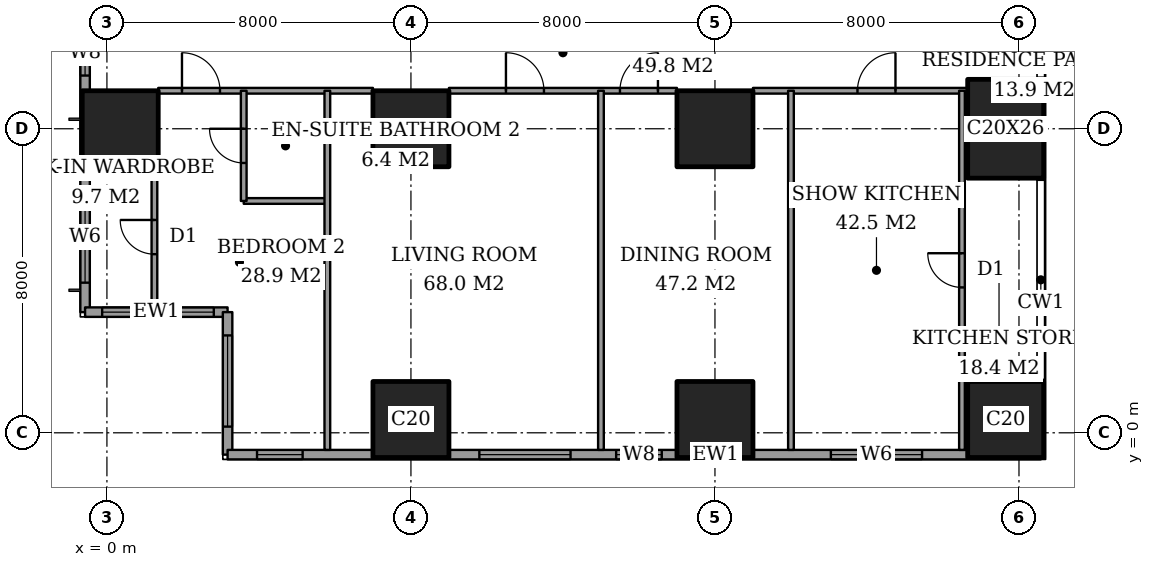
"""IFC4 building model, lengths in metres.
Left out: names, types, materials, properties, quantities, classifications, styles, units other than length and angle.
Written with IfcOpenShell. Run it as: python <this file> out.ifc"""

import sys

from ifc_helpers import new_model, si_unit, direction, frame, frame_2d, origin, origin_2d, place, context, subcontext, project, spatial, rectangle, extrude, element, fill, save


model = new_model("IFC4")
c1 = context("Model", 3, precision=1e-05, world=origin(), true_north=direction((0.0, 1.0)))
c2 = subcontext(c1, "Body", "Model", "MODEL_VIEW")
j1 = project(units=[si_unit("LENGTHUNIT", "METRE"), si_unit("PLANEANGLEUNIT", "RADIAN")], contexts=[c1])
p1 = place(None, origin())
s1 = spatial("IfcSite", under=j1, at=p1, CompositionType="ELEMENT")
p2 = place(p1, origin())
s2 = spatial("IfcBuilding", under=s1, at=p2, CompositionType="ELEMENT")
p3 = place(p2, frame((0.0, 0.0, 72.8)))
s3 = spatial("IfcBuildingStorey", under=s2, at=p3, CompositionType="ELEMENT", Elevation=72.8)
for number, where, z_axis, x_axis in (
    (1, (0.35, 8.0, 0.0), (0.0, 0.0, 1.0), (1.0, 0.0, 0.0)),
    (2, (8.0, 0.35, 0.0), (0.0, 0.0, 1.0), (1.0, 0.0, 0.0)),
    (3, (8.0, 8.0, 0.0), (0.0, 0.0, 1.0), (1.0, 0.0, 0.0)),
    (4, (16.0, 0.35, 0.0), (0.0, 0.0, 1.0), (1.0, 0.0, 0.0)),
    (5, (16.0, 8.0, 0.0), (0.0, 0.0, 1.0), (1.0, 0.0, 0.0)),
    (6, (23.65, 0.35, 0.0), (0.0, 0.0, 1.0), (1.0, 0.0, 0.0)),
):
    element("IfcColumn", number, at=place(p3, frame(where, z_axis=z_axis, x_axis=x_axis)), inside=s3, PredefinedType="COLUMN", context=c2, shape_type="SweptSolid", body=[
        extrude(rectangle(XDim=2.0, YDim=2.0, at=origin_2d()), origin(), (0.0, 0.0, 1.0), 3.6),
    ])
p4 = place(p3, frame((23.65, 8.0, 0.0), z_axis=(0.0, 0.0, 1.0), x_axis=(1.0, 0.0, 0.0)))
e7 = element("IfcColumn", 7, at=p4, inside=s3, PredefinedType="COLUMN", context=c2, shape_type="SweptSolid", body=[
    extrude(rectangle(XDim=2.0, YDim=2.6, at=origin_2d()), origin(), (0.0, 0.0, 1.0), 3.6),
])
p5 = place(p3, frame((-0.575, 44.825, 0.0), z_axis=(0.0, 0.0, 1.0), x_axis=(0.0, -1.0, 0.0)))
e8 = element("IfcWall", 8, at=p5, inside=s3, PredefinedType="SOLIDWALL", context=c2, shape_type="SweptSolid", body=[
    extrude(rectangle(XDim=41.65, YDim=0.25, at=frame_2d((20.825, 0.0))), origin(), (0.0, 0.0, 1.0), 3.6),
])
p6 = place(p5, frame((0.775, 0.0, 0.6)))
e9 = element("IfcOpeningElement", 9, at=p6, cuts=e8, PredefinedType="OPENING", context=c2, shape_type="SweptSolid", body=[
    extrude(rectangle(XDim=2.4, YDim=2.0, at=frame_2d((1.2, 1.0))), frame((0.0, 0.135, 0.0), z_axis=(0.0, -1.0, 0.0), x_axis=(1.0, 0.0, 0.0)), (0.0, 0.0, 1.0), 0.27),
])
p7 = place(p5, frame((6.1, 0.0, 0.6)))
e10 = element("IfcOpeningElement", 10, at=p7, cuts=e8, PredefinedType="OPENING", context=c2, shape_type="SweptSolid", body=[
    extrude(rectangle(XDim=1.2, YDim=2.0, at=frame_2d((0.6, 1.0))), frame((0.0, 0.135, 0.0), z_axis=(0.0, -1.0, 0.0), x_axis=(1.0, 0.0, 0.0)), (0.0, 0.0, 1.0), 0.27),
])
p8 = place(p5, frame((8.425, 0.0, 0.6)))
e11 = element("IfcOpeningElement", 11, at=p8, cuts=e8, PredefinedType="OPENING", context=c2, shape_type="SweptSolid", body=[
    extrude(rectangle(XDim=2.4, YDim=2.0, at=frame_2d((1.2, 1.0))), frame((0.0, 0.135, 0.0), z_axis=(0.0, -1.0, 0.0), x_axis=(1.0, 0.0, 0.0)), (0.0, 0.0, 1.0), 0.27),
])
p9 = place(p5, frame((15.625, 0.0, 0.6)))
e12 = element("IfcOpeningElement", 12, at=p9, cuts=e8, PredefinedType="OPENING", context=c2, shape_type="SweptSolid", body=[
    extrude(rectangle(XDim=2.4, YDim=2.0, at=frame_2d((1.2, 1.0))), frame((0.0, 0.135, 0.0), z_axis=(0.0, -1.0, 0.0), x_axis=(1.0, 0.0, 0.0)), (0.0, 0.0, 1.0), 0.27),
])
p10 = place(p5, frame((23.625, 0.0, 0.6)))
e13 = element("IfcOpeningElement", 13, at=p10, cuts=e8, PredefinedType="OPENING", context=c2, shape_type="SweptSolid", body=[
    extrude(rectangle(XDim=2.4, YDim=2.0, at=frame_2d((1.2, 1.0))), frame((0.0, 0.135, 0.0), z_axis=(0.0, -1.0, 0.0), x_axis=(1.0, 0.0, 0.0)), (0.0, 0.0, 1.0), 0.27),
])
p11 = place(p5, frame((30.625, 0.0, 0.6)))
e14 = element("IfcOpeningElement", 14, at=p11, cuts=e8, PredefinedType="OPENING", context=c2, shape_type="SweptSolid", body=[
    extrude(rectangle(XDim=2.4, YDim=2.0, at=frame_2d((1.2, 1.0))), frame((0.0, 0.135, 0.0), z_axis=(0.0, -1.0, 0.0), x_axis=(1.0, 0.0, 0.0)), (0.0, 0.0, 1.0), 0.27),
])
p12 = place(p5, frame((34.225, 0.0, 0.6)))
e15 = element("IfcOpeningElement", 15, at=p12, cuts=e8, PredefinedType="OPENING", context=c2, shape_type="SweptSolid", body=[
    extrude(rectangle(XDim=1.2, YDim=2.0, at=frame_2d((0.6, 1.0))), frame((0.0, 0.135, 0.0), z_axis=(0.0, -1.0, 0.0), x_axis=(1.0, 0.0, 0.0)), (0.0, 0.0, 1.0), 0.27),
])
p13 = place(p5, frame((38.475, 0.0, 0.6)))
e16 = element("IfcOpeningElement", 16, at=p13, cuts=e8, PredefinedType="OPENING", context=c2, shape_type="SweptSolid", body=[
    extrude(rectangle(XDim=2.4, YDim=2.0, at=frame_2d((1.2, 1.0))), frame((0.0, 0.135, 0.0), z_axis=(0.0, -1.0, 0.0), x_axis=(1.0, 0.0, 0.0)), (0.0, 0.0, 1.0), 0.27),
])
p14 = place(p3, frame((-0.575, 3.175, 0.0), z_axis=(0.0, 0.0, 1.0), x_axis=(1.0, 0.0, 0.0)))
e17 = element("IfcWall", 17, at=p14, inside=s3, PredefinedType="SOLIDWALL", context=c2, shape_type="SweptSolid", body=[
    extrude(rectangle(XDim=3.75, YDim=0.25, at=frame_2d((1.875, 0.0))), origin(), (0.0, 0.0, 1.0), 3.6),
])
p15 = place(p14, frame((0.45, 0.0, 0.6)))
e18 = element("IfcOpeningElement", 18, at=p15, cuts=e17, PredefinedType="OPENING", context=c2, shape_type="SweptSolid", body=[
    extrude(rectangle(XDim=1.2, YDim=2.0, at=frame_2d((0.6, 1.0))), frame((0.0, 0.135, 0.0), z_axis=(0.0, -1.0, 0.0), x_axis=(1.0, 0.0, 0.0)), (0.0, 0.0, 1.0), 0.27),
])
p16 = place(p14, frame((2.188, 0.0, 0.6)))
e19 = element("IfcOpeningElement", 19, at=p16, cuts=e17, PredefinedType="OPENING", context=c2, shape_type="SweptSolid", body=[
    extrude(rectangle(XDim=1.2, YDim=2.0, at=frame_2d((0.6, 1.0))), frame((0.0, 0.135, 0.0), z_axis=(0.0, -1.0, 0.0), x_axis=(1.0, 0.0, 0.0)), (0.0, 0.0, 1.0), 0.27),
])
p17 = place(p3, frame((3.175, 3.175, 0.0), z_axis=(0.0, 0.0, 1.0), x_axis=(0.0, -1.0, 0.0)))
e20 = element("IfcWall", 20, at=p17, inside=s3, PredefinedType="SOLIDWALL", context=c2, shape_type="SweptSolid", body=[
    extrude(rectangle(XDim=3.75, YDim=0.25, at=frame_2d((1.875, 0.0))), origin(), (0.0, 0.0, 1.0), 3.6),
])
p18 = place(p17, frame((0.613, 0.0, 0.6)))
e21 = element("IfcOpeningElement", 21, at=p18, cuts=e20, PredefinedType="OPENING", context=c2, shape_type="SweptSolid", body=[
    extrude(rectangle(XDim=2.4, YDim=2.0, at=frame_2d((1.2, 1.0))), frame((0.0, 0.135, 0.0), z_axis=(0.0, -1.0, 0.0), x_axis=(1.0, 0.0, 0.0)), (0.0, 0.0, 1.0), 0.27),
])
p19 = place(p3, frame((3.175, -0.575, 0.0), z_axis=(0.0, 0.0, 1.0), x_axis=(1.0, 0.0, 0.0)))
e22 = element("IfcWall", 22, at=p19, inside=s3, PredefinedType="SOLIDWALL", context=c2, shape_type="SweptSolid", body=[
    extrude(rectangle(XDim=21.4, YDim=0.25, at=frame_2d((10.7, 0.0))), origin(), (0.0, 0.0, 1.0), 3.6),
])
p20 = place(p19, frame((0.775, 0.0, 0.6)))
e23 = element("IfcOpeningElement", 23, at=p20, cuts=e22, PredefinedType="OPENING", context=c2, shape_type="SweptSolid", body=[
    extrude(rectangle(XDim=1.2, YDim=2.0, at=frame_2d((0.6, 1.0))), frame((0.0, 0.135, 0.0), z_axis=(0.0, -1.0, 0.0), x_axis=(1.0, 0.0, 0.0)), (0.0, 0.0, 1.0), 0.27),
])
p21 = place(p19, frame((6.625, 0.0, 0.6)))
e24 = element("IfcOpeningElement", 24, at=p21, cuts=e22, PredefinedType="OPENING", context=c2, shape_type="SweptSolid", body=[
    extrude(rectangle(XDim=2.4, YDim=2.0, at=frame_2d((1.2, 1.0))), frame((0.0, 0.135, 0.0), z_axis=(0.0, -1.0, 0.0), x_axis=(1.0, 0.0, 0.0)), (0.0, 0.0, 1.0), 0.27),
])
p22 = place(p19, frame((10.225, 0.0, 0.6)))
e25 = element("IfcOpeningElement", 25, at=p22, cuts=e22, PredefinedType="OPENING", context=c2, shape_type="SweptSolid", body=[
    extrude(rectangle(XDim=1.2, YDim=2.0, at=frame_2d((0.6, 1.0))), frame((0.0, 0.135, 0.0), z_axis=(0.0, -1.0, 0.0), x_axis=(1.0, 0.0, 0.0)), (0.0, 0.0, 1.0), 0.27),
])
p23 = place(p19, frame((15.875, 0.0, 0.6)))
e26 = element("IfcOpeningElement", 26, at=p23, cuts=e22, PredefinedType="OPENING", context=c2, shape_type="SweptSolid", body=[
    extrude(rectangle(XDim=2.4, YDim=2.0, at=frame_2d((1.2, 1.0))), frame((0.0, 0.135, 0.0), z_axis=(0.0, -1.0, 0.0), x_axis=(1.0, 0.0, 0.0)), (0.0, 0.0, 1.0), 0.27),
])
p24 = place(p3, frame((3.6, 6.1, 0.0), z_axis=(0.0, 0.0, 1.0), x_axis=(1.0, 0.0, 0.0)))
e27 = element("IfcWall", 27, at=p24, inside=s3, PredefinedType="PARTITIONING", context=c2, shape_type="SweptSolid", body=[
    extrude(rectangle(XDim=2.2, YDim=0.15, at=frame_2d((1.1, 0.0))), origin(), (0.0, 0.0, 1.0), 3.35),
])
p25 = place(p3, frame((1.35, 9.0, 0.0), z_axis=(0.0, 0.0, 1.0), x_axis=(1.0, 0.0, 0.0)))
e28 = element("IfcWall", 28, at=p25, inside=s3, PredefinedType="PARTITIONING", context=c2, shape_type="SweptSolid", body=[
    extrude(rectangle(XDim=5.65, YDim=0.15, at=frame_2d((2.825, 0.0))), origin(), (0.0, 0.0, 1.0), 3.35),
])
p26 = place(p25, frame((0.625, 0.0, 0.0)))
e29 = element("IfcOpeningElement", 29, at=p26, cuts=e28, PredefinedType="OPENING", context=c2, shape_type="SweptSolid", body=[
    extrude(rectangle(XDim=1.0, YDim=2.1, at=frame_2d((0.5, 1.05))), frame((0.0, 0.085, 0.0), z_axis=(0.0, -1.0, 0.0), x_axis=(1.0, 0.0, 0.0)), (0.0, 0.0, 1.0), 0.17),
])
p27 = place(p3, frame((9.0, 9.0, 0.0), z_axis=(0.0, 0.0, 1.0), x_axis=(1.0, 0.0, 0.0)))
e30 = element("IfcWall", 30, at=p27, inside=s3, PredefinedType="PARTITIONING", context=c2, shape_type="SweptSolid", body=[
    extrude(rectangle(XDim=6.0, YDim=0.15, at=frame_2d((3.0, 0.0))), origin(), (0.0, 0.0, 1.0), 3.35),
])
p28 = place(p27, frame((1.5, 0.0, 0.0)))
e31 = element("IfcOpeningElement", 31, at=p28, cuts=e30, PredefinedType="OPENING", context=c2, shape_type="SweptSolid", body=[
    extrude(rectangle(XDim=1.0, YDim=2.1, at=frame_2d((0.5, 1.05))), frame((0.0, 0.085, 0.0), z_axis=(0.0, -1.0, 0.0), x_axis=(1.0, 0.0, 0.0)), (0.0, 0.0, 1.0), 0.17),
])
p29 = place(p27, frame((4.5, 0.0, 0.0)))
e32 = element("IfcOpeningElement", 32, at=p29, cuts=e30, PredefinedType="OPENING", context=c2, shape_type="SweptSolid", body=[
    extrude(rectangle(XDim=1.0, YDim=2.1, at=frame_2d((0.5, 1.05))), frame((0.0, 0.085, 0.0), z_axis=(0.0, -1.0, 0.0), x_axis=(1.0, 0.0, 0.0)), (0.0, 0.0, 1.0), 0.17),
])
p30 = place(p3, frame((17.0, 9.0, 0.0), z_axis=(0.0, 0.0, 1.0), x_axis=(1.0, 0.0, 0.0)))
e33 = element("IfcWall", 33, at=p30, inside=s3, PredefinedType="PARTITIONING", context=c2, shape_type="SweptSolid", body=[
    extrude(rectangle(XDim=5.65, YDim=0.15, at=frame_2d((2.825, 0.0))), origin(), (0.0, 0.0, 1.0), 3.35),
])
p31 = place(p30, frame((2.75, 0.0, 0.0)))
e34 = element("IfcOpeningElement", 34, at=p31, cuts=e33, PredefinedType="OPENING", context=c2, shape_type="SweptSolid", body=[
    extrude(rectangle(XDim=1.0, YDim=2.1, at=frame_2d((0.5, 1.05))), frame((0.0, 0.085, 0.0), z_axis=(0.0, -1.0, 0.0), x_axis=(1.0, 0.0, 0.0)), (0.0, 0.0, 1.0), 0.17),
])
p32 = place(p3, frame((1.25, 3.3, 0.0), z_axis=(0.0, 0.0, 1.0), x_axis=(0.0, 1.0, 0.0)))
e35 = element("IfcWall", 35, at=p32, inside=s3, PredefinedType="PARTITIONING", context=c2, shape_type="SweptSolid", body=[
    extrude(rectangle(XDim=3.7, YDim=0.15, at=frame_2d((1.85, 0.0))), origin(), (0.0, 0.0, 1.0), 3.35),
])
p33 = place(p32, frame((1.4, 0.0, 0.0)))
e36 = element("IfcOpeningElement", 36, at=p33, cuts=e35, PredefinedType="OPENING", context=c2, shape_type="SweptSolid", body=[
    extrude(rectangle(XDim=0.9, YDim=2.1, at=frame_2d((0.45, 1.05))), frame((0.0, 0.085, 0.0), z_axis=(0.0, -1.0, 0.0), x_axis=(1.0, 0.0, 0.0)), (0.0, 0.0, 1.0), 0.17),
])
p34 = place(p3, frame((3.6, 6.1, 0.0), z_axis=(0.0, 0.0, 1.0), x_axis=(0.0, 1.0, 0.0)))
e37 = element("IfcWall", 37, at=p34, inside=s3, PredefinedType="PARTITIONING", context=c2, shape_type="SweptSolid", body=[
    extrude(rectangle(XDim=2.9, YDim=0.15, at=frame_2d((1.45, 0.0))), origin(), (0.0, 0.0, 1.0), 3.35),
])
p35 = place(p34, frame((1.0, 0.0, 0.0)))
e38 = element("IfcOpeningElement", 38, at=p35, cuts=e37, PredefinedType="OPENING", context=c2, shape_type="SweptSolid", body=[
    extrude(rectangle(XDim=0.9, YDim=2.1, at=frame_2d((0.45, 1.05))), frame((0.0, 0.085, 0.0), z_axis=(0.0, -1.0, 0.0), x_axis=(1.0, 0.0, 0.0)), (0.0, 0.0, 1.0), 0.17),
])
for number, where, z_axis, x_axis in (
    (39, (5.8, -0.45, 0.0), (0.0, 0.0, 1.0), (0.0, 1.0, 0.0)),
    (40, (13.0, -0.45, 0.0), (0.0, 0.0, 1.0), (0.0, 1.0, 0.0)),
    (41, (18.0, -0.45, 0.0), (0.0, 0.0, 1.0), (0.0, 1.0, 0.0)),
):
    element("IfcWall", number, at=place(p3, frame(where, z_axis=z_axis, x_axis=x_axis)), inside=s3, PredefinedType="PARTITIONING", context=c2, shape_type="SweptSolid", body=[
        extrude(rectangle(XDim=9.45, YDim=0.15, at=frame_2d((4.725, 0.0))), origin(), (0.0, 0.0, 1.0), 3.35),
    ])
p36 = place(p3, frame((22.5, -0.45, 0.0), z_axis=(0.0, 0.0, 1.0), x_axis=(0.0, 1.0, 0.0)))
e42 = element("IfcWall", 42, at=p36, inside=s3, PredefinedType="PARTITIONING", context=c2, shape_type="SweptSolid", body=[
    extrude(rectangle(XDim=9.45, YDim=0.15, at=frame_2d((4.725, 0.0))), origin(), (0.0, 0.0, 1.0), 3.35),
])
p37 = place(p36, frame((4.275, 0.0, 0.0)))
e43 = element("IfcOpeningElement", 43, at=p37, cuts=e42, PredefinedType="OPENING", context=c2, shape_type="SweptSolid", body=[
    extrude(rectangle(XDim=0.9, YDim=2.1, at=frame_2d((0.45, 1.05))), frame((0.0, 0.085, 0.0), z_axis=(0.0, -1.0, 0.0), x_axis=(1.0, 0.0, 0.0)), (0.0, 0.0, 1.0), 0.17),
])
p38 = place(p12, origin())
e44 = element("IfcWindow", 44, at=p38, inside=s3, PartitioningType="SINGLE_PANEL", PredefinedType="WINDOW", context=c2, shape_type="SweptSolid", body=[
    extrude(rectangle(XDim=1.2, YDim=2.0, at=frame_2d((0.6, 1.0))), frame((0.0, 0.03, 0.0), z_axis=(0.0, -1.0, 0.0), x_axis=(1.0, 0.0, 0.0)), (0.0, 0.0, 1.0), 0.06),
])
fill(e15, e44)
p39 = place(p13, origin())
e45 = element("IfcWindow", 45, at=p39, inside=s3, PartitioningType="SINGLE_PANEL", PredefinedType="WINDOW", context=c2, shape_type="SweptSolid", body=[
    extrude(rectangle(XDim=2.4, YDim=2.0, at=frame_2d((1.2, 1.0))), frame((0.0, 0.03, 0.0), z_axis=(0.0, -1.0, 0.0), x_axis=(1.0, 0.0, 0.0)), (0.0, 0.0, 1.0), 0.06),
])
fill(e16, e45)
p40 = place(p15, origin())
e46 = element("IfcWindow", 46, at=p40, inside=s3, PartitioningType="SINGLE_PANEL", PredefinedType="WINDOW", context=c2, shape_type="SweptSolid", body=[
    extrude(rectangle(XDim=1.2, YDim=2.0, at=frame_2d((0.6, 1.0))), frame((0.0, 0.03, 0.0), z_axis=(0.0, -1.0, 0.0), x_axis=(1.0, 0.0, 0.0)), (0.0, 0.0, 1.0), 0.06),
])
fill(e18, e46)
p41 = place(p16, origin())
e47 = element("IfcWindow", 47, at=p41, inside=s3, PartitioningType="SINGLE_PANEL", PredefinedType="WINDOW", context=c2, shape_type="SweptSolid", body=[
    extrude(rectangle(XDim=1.2, YDim=2.0, at=frame_2d((0.6, 1.0))), frame((0.0, 0.03, 0.0), z_axis=(0.0, -1.0, 0.0), x_axis=(1.0, 0.0, 0.0)), (0.0, 0.0, 1.0), 0.06),
])
fill(e19, e47)
p42 = place(p18, origin())
e48 = element("IfcWindow", 48, at=p42, inside=s3, PartitioningType="SINGLE_PANEL", PredefinedType="WINDOW", context=c2, shape_type="SweptSolid", body=[
    extrude(rectangle(XDim=2.4, YDim=2.0, at=frame_2d((1.2, 1.0))), frame((0.0, 0.03, 0.0), z_axis=(0.0, -1.0, 0.0), x_axis=(1.0, 0.0, 0.0)), (0.0, 0.0, 1.0), 0.06),
])
fill(e21, e48)
p43 = place(p20, origin())
e49 = element("IfcWindow", 49, at=p43, inside=s3, PartitioningType="SINGLE_PANEL", PredefinedType="WINDOW", context=c2, shape_type="SweptSolid", body=[
    extrude(rectangle(XDim=1.2, YDim=2.0, at=frame_2d((0.6, 1.0))), frame((0.0, 0.03, 0.0), z_axis=(0.0, -1.0, 0.0), x_axis=(1.0, 0.0, 0.0)), (0.0, 0.0, 1.0), 0.06),
])
fill(e23, e49)
p44 = place(p21, origin())
e50 = element("IfcWindow", 50, at=p44, inside=s3, PartitioningType="SINGLE_PANEL", PredefinedType="WINDOW", context=c2, shape_type="SweptSolid", body=[
    extrude(rectangle(XDim=2.4, YDim=2.0, at=frame_2d((1.2, 1.0))), frame((0.0, 0.03, 0.0), z_axis=(0.0, -1.0, 0.0), x_axis=(1.0, 0.0, 0.0)), (0.0, 0.0, 1.0), 0.06),
])
fill(e24, e50)
p45 = place(p22, origin())
e51 = element("IfcWindow", 51, at=p45, inside=s3, PartitioningType="SINGLE_PANEL", PredefinedType="WINDOW", context=c2, shape_type="SweptSolid", body=[
    extrude(rectangle(XDim=1.2, YDim=2.0, at=frame_2d((0.6, 1.0))), frame((0.0, 0.03, 0.0), z_axis=(0.0, -1.0, 0.0), x_axis=(1.0, 0.0, 0.0)), (0.0, 0.0, 1.0), 0.06),
])
fill(e25, e51)
p46 = place(p23, origin())
e52 = element("IfcWindow", 52, at=p46, inside=s3, PartitioningType="SINGLE_PANEL", PredefinedType="WINDOW", context=c2, shape_type="SweptSolid", body=[
    extrude(rectangle(XDim=2.4, YDim=2.0, at=frame_2d((1.2, 1.0))), frame((0.0, 0.03, 0.0), z_axis=(0.0, -1.0, 0.0), x_axis=(1.0, 0.0, 0.0)), (0.0, 0.0, 1.0), 0.06),
])
fill(e26, e52)
p47 = place(p33, origin())
e53 = element("IfcDoor", 53, at=p47, inside=s3, OperationType="SINGLE_SWING_LEFT", PredefinedType="DOOR", context=c2, shape_type="SweptSolid", body=[
    extrude(rectangle(XDim=0.9, YDim=2.1, at=frame_2d((0.45, 1.05))), frame((0.0, 0.025, 0.0), z_axis=(0.0, -1.0, 0.0), x_axis=(1.0, 0.0, 0.0)), (0.0, 0.0, 1.0), 0.05),
])
fill(e36, e53)
p48 = place(p35, origin())
e54 = element("IfcDoor", 54, at=p48, inside=s3, OperationType="SINGLE_SWING_LEFT", PredefinedType="DOOR", context=c2, shape_type="SweptSolid", body=[
    extrude(rectangle(XDim=0.9, YDim=2.1, at=frame_2d((0.45, 1.05))), frame((0.0, 0.025, 0.0), z_axis=(0.0, -1.0, 0.0), x_axis=(1.0, 0.0, 0.0)), (0.0, 0.0, 1.0), 0.05),
])
fill(e38, e54)
p49 = place(p26, origin())
e55 = element("IfcDoor", 55, at=p49, inside=s3, OperationType="SINGLE_SWING_RIGHT", PredefinedType="DOOR", context=c2, shape_type="SweptSolid", body=[
    extrude(rectangle(XDim=1.0, YDim=2.1, at=frame_2d((0.5, 1.05))), frame((0.0, 0.025, 0.0), z_axis=(0.0, -1.0, 0.0), x_axis=(1.0, 0.0, 0.0)), (0.0, 0.0, 1.0), 0.05),
])
fill(e29, e55)
p50 = place(p28, origin())
e56 = element("IfcDoor", 56, at=p50, inside=s3, OperationType="SINGLE_SWING_RIGHT", PredefinedType="DOOR", context=c2, shape_type="SweptSolid", body=[
    extrude(rectangle(XDim=1.0, YDim=2.1, at=frame_2d((0.5, 1.05))), frame((0.0, 0.025, 0.0), z_axis=(0.0, -1.0, 0.0), x_axis=(1.0, 0.0, 0.0)), (0.0, 0.0, 1.0), 0.05),
])
fill(e31, e56)
p51 = place(p29, origin())
e57 = element("IfcDoor", 57, at=p51, inside=s3, OperationType="SINGLE_SWING_LEFT", PredefinedType="DOOR", context=c2, shape_type="SweptSolid", body=[
    extrude(rectangle(XDim=1.0, YDim=2.1, at=frame_2d((0.5, 1.05))), frame((0.0, 0.025, 0.0), z_axis=(0.0, -1.0, 0.0), x_axis=(1.0, 0.0, 0.0)), (0.0, 0.0, 1.0), 0.05),
])
fill(e32, e57)
p52 = place(p31, origin())
e58 = element("IfcDoor", 58, at=p52, inside=s3, OperationType="SINGLE_SWING_LEFT", PredefinedType="DOOR", context=c2, shape_type="SweptSolid", body=[
    extrude(rectangle(XDim=1.0, YDim=2.1, at=frame_2d((0.5, 1.05))), frame((0.0, 0.025, 0.0), z_axis=(0.0, -1.0, 0.0), x_axis=(1.0, 0.0, 0.0)), (0.0, 0.0, 1.0), 0.05),
])
fill(e34, e58)
p53 = place(p37, origin())
e59 = element("IfcDoor", 59, at=p53, inside=s3, OperationType="SINGLE_SWING_LEFT", PredefinedType="DOOR", context=c2, shape_type="SweptSolid", body=[
    extrude(rectangle(XDim=0.9, YDim=2.1, at=frame_2d((0.45, 1.05))), frame((0.0, 0.025, 0.0), z_axis=(0.0, -1.0, 0.0), x_axis=(1.0, 0.0, 0.0)), (0.0, 0.0, 1.0), 0.05),
])
fill(e43, e59)
save(model, sys.argv[1])
